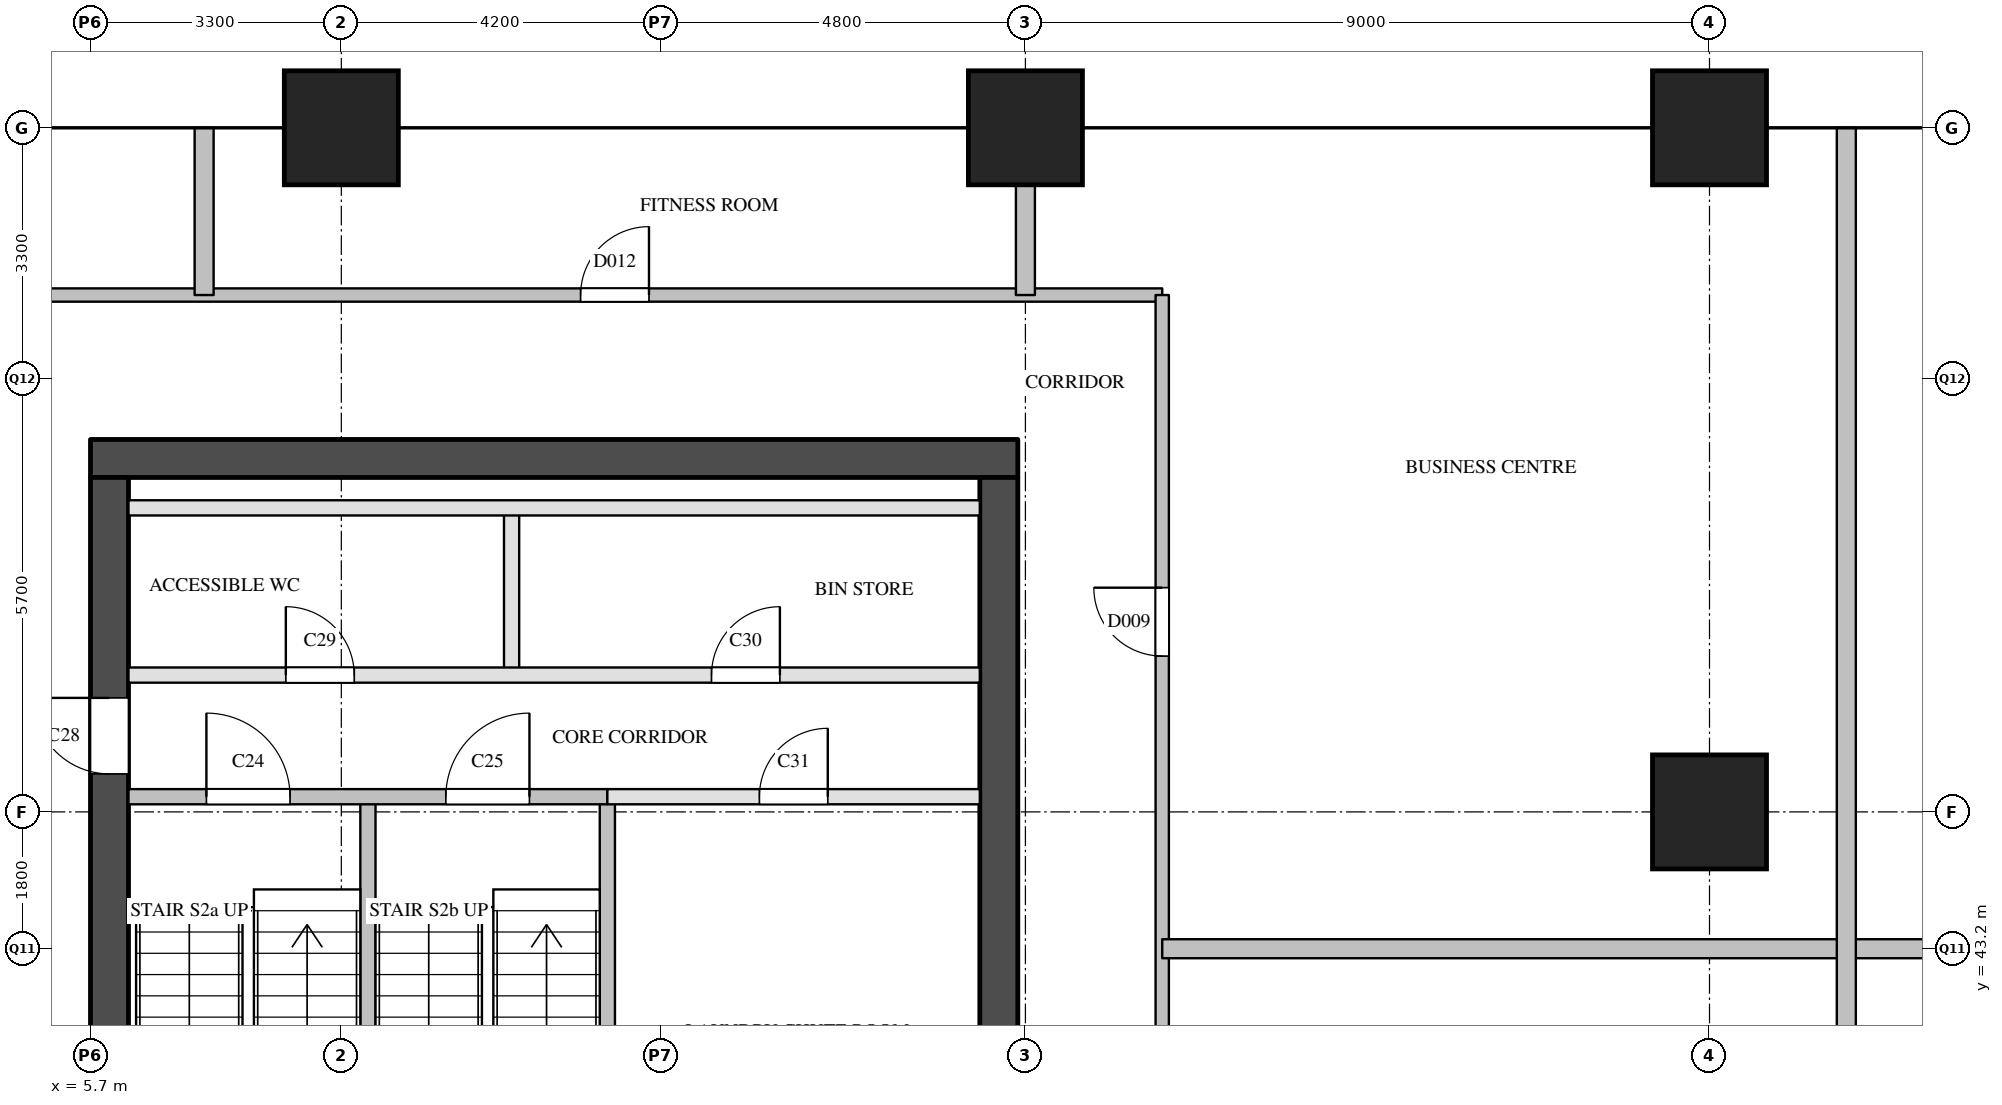
"""IFC4 building model, lengths in metres.
Left out: names, types, materials, properties, quantities, classifications, styles, units other than length and angle.
Written with IfcOpenShell. Run it as: python <this file> out.ifc"""

import sys

from ifc_helpers import new_model, si_unit, direction, frame, frame_2d, origin, origin_2d, place, context, subcontext, project, spatial, rectangle, extrude, element, fill, save


model = new_model("IFC4")
c1 = context("Model", 3, precision=1e-05, world=origin(), true_north=direction((0.0, 1.0)))
c2 = subcontext(c1, "Body", "Model", "MODEL_VIEW")
j1 = project(units=[si_unit("LENGTHUNIT", "METRE"), si_unit("PLANEANGLEUNIT", "RADIAN")], contexts=[c1])
p1 = place(None, origin())
s1 = spatial("IfcSite", under=j1, at=p1, CompositionType="ELEMENT")
p2 = place(p1, origin())
s2 = spatial("IfcBuilding", under=s1, at=p2, CompositionType="ELEMENT")
p3 = place(p2, frame((0.0, 0.0, 185.6)))
s3 = spatial("IfcBuildingStorey", under=s2, at=p3, CompositionType="ELEMENT", Elevation=185.6)
for number, where, z_axis, x_axis in (
    (1, (9.0, 54.0, 0.0), (0.0, 0.0, 1.0), (1.0, 0.0, 0.0)),
    (2, (18.0, 54.0, 0.0), (0.0, 0.0, 1.0), (1.0, 0.0, 0.0)),
    (3, (27.0, 45.0, 0.0), (0.0, 0.0, 1.0), (1.0, 0.0, 0.0)),
    (4, (27.0, 54.0, 0.0), (0.0, 0.0, 1.0), (1.0, 0.0, 0.0)),
):
    element("IfcColumn", number, at=place(p3, frame(where, z_axis=z_axis, x_axis=x_axis)), inside=s3, PredefinedType="COLUMN", context=c2, shape_type="SweptSolid", body=[
        extrude(rectangle(XDim=1.5, YDim=1.5, at=origin_2d()), origin(), (0.0, 0.0, 1.0), 3.9),
    ])
p4 = place(p3, frame((5.7, 49.65, 0.0), z_axis=(0.0, 0.0, 1.0), x_axis=(1.0, 0.0, 0.0)))
e5 = element("IfcWall", 5, at=p4, inside=s3, PredefinedType="SHEAR", context=c2, shape_type="SweptSolid", body=[
    extrude(rectangle(XDim=12.2, YDim=0.5, at=frame_2d((6.1, 0.0))), origin(), (0.0, 0.0, 1.0), 3.6),
])
p5 = place(p3, frame((5.95, 29.1, 0.0), z_axis=(0.0, 0.0, 1.0), x_axis=(0.0, 1.0, 0.0)))
e6 = element("IfcWall", 6, at=p5, inside=s3, PredefinedType="SHEAR", context=c2, shape_type="SweptSolid", body=[
    extrude(rectangle(XDim=20.3, YDim=0.5, at=frame_2d((10.15, 0.0))), origin(), (0.0, 0.0, 1.0), 3.6),
])
p6 = place(p5, frame((3.45, 0.0, 0.0)))
e7 = element("IfcOpeningElement", 7, at=p6, cuts=e6, PredefinedType="OPENING", context=c2, shape_type="SweptSolid", body=[
    extrude(rectangle(XDim=1.0, YDim=2.1, at=frame_2d((0.5, 1.05))), frame((0.0, 0.26, 0.0), z_axis=(0.0, -1.0, 0.0), x_axis=(1.0, 0.0, 0.0)), (0.0, 0.0, 1.0), 0.52),
])
p7 = place(p5, frame((16.4, 0.0, 0.0)))
e8 = element("IfcOpeningElement", 8, at=p7, cuts=e6, PredefinedType="OPENING", context=c2, shape_type="SweptSolid", body=[
    extrude(rectangle(XDim=1.0, YDim=2.1, at=frame_2d((0.5, 1.05))), frame((0.0, 0.26, 0.0), z_axis=(0.0, -1.0, 0.0), x_axis=(1.0, 0.0, 0.0)), (0.0, 0.0, 1.0), 0.52),
])
p8 = place(p3, frame((17.65, 29.1, 0.0), z_axis=(0.0, 0.0, 1.0), x_axis=(0.0, 1.0, 0.0)))
e9 = element("IfcWall", 9, at=p8, inside=s3, PredefinedType="SHEAR", context=c2, shape_type="SweptSolid", body=[
    extrude(rectangle(XDim=20.3, YDim=0.5, at=frame_2d((10.15, 0.0))), origin(), (0.0, 0.0, 1.0), 3.6),
])
p9 = place(p8, frame((1.25, 0.0, 0.0)))
e10 = element("IfcOpeningElement", 10, at=p9, cuts=e9, PredefinedType="OPENING", context=c2, shape_type="SweptSolid", body=[
    extrude(rectangle(XDim=0.7, YDim=2.1, at=frame_2d((0.35, 1.05))), frame((0.0, 0.26, 0.0), z_axis=(0.0, -1.0, 0.0), x_axis=(1.0, 0.0, 0.0)), (0.0, 0.0, 1.0), 0.52),
])
p10 = place(p8, frame((7.05, 0.0, 0.0)))
e11 = element("IfcOpeningElement", 11, at=p10, cuts=e9, PredefinedType="OPENING", context=c2, shape_type="SweptSolid", body=[
    extrude(rectangle(XDim=0.7, YDim=2.1, at=frame_2d((0.35, 1.05))), frame((0.0, 0.26, 0.0), z_axis=(0.0, -1.0, 0.0), x_axis=(1.0, 0.0, 0.0)), (0.0, 0.0, 1.0), 0.52),
])
p11 = place(p8, frame((3.6, 0.0, 0.0)))
e12 = element("IfcOpeningElement", 12, at=p11, cuts=e9, PredefinedType="OPENING", context=c2, shape_type="SweptSolid", body=[
    extrude(rectangle(XDim=1.8, YDim=2.1, at=frame_2d((0.9, 1.05))), frame((0.0, 0.26, 0.0), z_axis=(0.0, -1.0, 0.0), x_axis=(1.0, 0.0, 0.0)), (0.0, 0.0, 1.0), 0.52),
])
p12 = place(p3, frame((9.35, 40.9, 0.0), z_axis=(0.0, 0.0, 1.0), x_axis=(0.0, 1.0, 0.0)))
e13 = element("IfcWall", 13, at=p12, inside=s3, PredefinedType="SOLIDWALL", context=c2, shape_type="SweptSolid", body=[
    extrude(rectangle(XDim=4.3, YDim=0.2, at=frame_2d((2.15, 0.0))), origin(), (0.0, 0.0, 1.0), 3.6),
])
p13 = place(p3, frame((11.24, 46.8, 0.0), z_axis=(0.0, 0.0, 1.0), x_axis=(0.0, 1.0, 0.0)))
e14 = element("IfcWall", 14, at=p13, inside=s3, PredefinedType="PARTITIONING", context=c2, shape_type="SweptSolid", body=[
    extrude(rectangle(XDim=2.2, YDim=0.2, at=frame_2d((1.1, 0.0))), origin(), (0.0, 0.0, 1.0), 3.6),
])
p14 = place(p3, frame((12.5, 40.9, 0.0), z_axis=(0.0, 0.0, 1.0), x_axis=(0.0, 1.0, 0.0)))
e15 = element("IfcWall", 15, at=p14, inside=s3, PredefinedType="SOLIDWALL", context=c2, shape_type="SweptSolid", body=[
    extrude(rectangle(XDim=4.3, YDim=0.2, at=frame_2d((2.15, 0.0))), origin(), (0.0, 0.0, 1.0), 3.6),
])
p15 = place(p3, frame((12.5, 45.2, 0.0), z_axis=(0.0, 0.0, 1.0), x_axis=(1.0, 0.0, 0.0)))
e16 = element("IfcWall", 16, at=p15, inside=s3, PredefinedType="PARTITIONING", context=c2, shape_type="SweptSolid", body=[
    extrude(rectangle(XDim=4.9, YDim=0.2, at=frame_2d((2.45, 0.0))), origin(), (0.0, 0.0, 1.0), 3.6),
])
p16 = place(p15, frame((2.0, 0.0, 0.0)))
e17 = element("IfcOpeningElement", 17, at=p16, cuts=e16, PredefinedType="OPENING", context=c2, shape_type="SweptSolid", body=[
    extrude(rectangle(XDim=0.9, YDim=2.1, at=frame_2d((0.45, 1.05))), frame((0.0, 0.11, 0.0), z_axis=(0.0, -1.0, 0.0), x_axis=(1.0, 0.0, 0.0)), (0.0, 0.0, 1.0), 0.22),
])
p17 = place(p3, frame((6.2, 45.2, 0.0), z_axis=(0.0, 0.0, 1.0), x_axis=(1.0, 0.0, 0.0)))
e18 = element("IfcWall", 18, at=p17, inside=s3, PredefinedType="SOLIDWALL", context=c2, shape_type="SweptSolid", body=[
    extrude(rectangle(XDim=6.3, YDim=0.2, at=frame_2d((3.15, 0.0))), origin(), (0.0, 0.0, 1.0), 3.6),
])
p18 = place(p17, frame((1.025, 0.0, 0.0)))
e19 = element("IfcOpeningElement", 19, at=p18, cuts=e18, PredefinedType="OPENING", context=c2, shape_type="SweptSolid", body=[
    extrude(rectangle(XDim=1.1, YDim=2.1, at=frame_2d((0.55, 1.05))), frame((0.0, 0.11, 0.0), z_axis=(0.0, -1.0, 0.0), x_axis=(1.0, 0.0, 0.0)), (0.0, 0.0, 1.0), 0.22),
])
p19 = place(p17, frame((4.175, 0.0, 0.0)))
e20 = element("IfcOpeningElement", 20, at=p19, cuts=e18, PredefinedType="OPENING", context=c2, shape_type="SweptSolid", body=[
    extrude(rectangle(XDim=1.1, YDim=2.1, at=frame_2d((0.55, 1.05))), frame((0.0, 0.11, 0.0), z_axis=(0.0, -1.0, 0.0), x_axis=(1.0, 0.0, 0.0)), (0.0, 0.0, 1.0), 0.22),
])
p20 = place(p3, frame((6.2, 46.8, 0.0), z_axis=(0.0, 0.0, 1.0), x_axis=(1.0, 0.0, 0.0)))
e21 = element("IfcWall", 21, at=p20, inside=s3, PredefinedType="PARTITIONING", context=c2, shape_type="SweptSolid", body=[
    extrude(rectangle(XDim=11.2, YDim=0.2, at=frame_2d((5.6, 0.0))), origin(), (0.0, 0.0, 1.0), 3.6),
])
p21 = place(p20, frame((2.07, 0.0, 0.0)))
e22 = element("IfcOpeningElement", 22, at=p21, cuts=e21, PredefinedType="OPENING", context=c2, shape_type="SweptSolid", body=[
    extrude(rectangle(XDim=0.9, YDim=2.1, at=frame_2d((0.45, 1.05))), frame((0.0, 0.11, 0.0), z_axis=(0.0, -1.0, 0.0), x_axis=(1.0, 0.0, 0.0)), (0.0, 0.0, 1.0), 0.22),
])
p22 = place(p20, frame((7.67, 0.0, 0.0)))
e23 = element("IfcOpeningElement", 23, at=p22, cuts=e21, PredefinedType="OPENING", context=c2, shape_type="SweptSolid", body=[
    extrude(rectangle(XDim=0.9, YDim=2.1, at=frame_2d((0.45, 1.05))), frame((0.0, 0.11, 0.0), z_axis=(0.0, -1.0, 0.0), x_axis=(1.0, 0.0, 0.0)), (0.0, 0.0, 1.0), 0.22),
])
p23 = place(p3, frame((6.2, 49.0, 0.0), z_axis=(0.0, 0.0, 1.0), x_axis=(1.0, 0.0, 0.0)))
e24 = element("IfcWall", 24, at=p23, inside=s3, PredefinedType="PARTITIONING", context=c2, shape_type="SweptSolid", body=[
    extrude(rectangle(XDim=11.2, YDim=0.2, at=frame_2d((5.6, 0.0))), origin(), (0.0, 0.0, 1.0), 3.6),
])
p24 = place(p3, frame((3.8, 51.8, 0.0), z_axis=(0.0, 0.0, 1.0), x_axis=(1.0, 0.0, 0.0)))
e25 = element("IfcWall", 25, at=p24, inside=s3, PredefinedType="PARTITIONING", context=c2, shape_type="SweptSolid", body=[
    extrude(rectangle(XDim=16.0, YDim=0.175, at=frame_2d((8.0, 0.0))), origin(), (0.0, 0.0, 1.0), 3.6),
])
p25 = place(p24, frame((8.348, 0.0, 0.0)))
e26 = element("IfcOpeningElement", 26, at=p25, cuts=e25, PredefinedType="OPENING", context=c2, shape_type="SweptSolid", body=[
    extrude(rectangle(XDim=0.9, YDim=2.1, at=frame_2d((0.45, 1.05))), frame((0.0, 0.097, 0.0), z_axis=(0.0, -1.0, 0.0), x_axis=(1.0, 0.0, 0.0)), (0.0, 0.0, 1.0), 0.195),
])
p26 = place(p3, frame((19.8, 28.5, 0.0), z_axis=(0.0, 0.0, 1.0), x_axis=(0.0, 1.0, 0.0)))
e27 = element("IfcWall", 27, at=p26, inside=s3, PredefinedType="PARTITIONING", context=c2, shape_type="SweptSolid", body=[
    extrude(rectangle(XDim=23.3, YDim=0.175, at=frame_2d((11.65, 0.0))), origin(), (0.0, 0.0, 1.0), 3.6),
])
p27 = place(p26, frame((3.3, 0.0, 0.0)))
e28 = element("IfcOpeningElement", 28, at=p27, cuts=e27, PredefinedType="OPENING", context=c2, shape_type="SweptSolid", body=[
    extrude(rectangle(XDim=0.9, YDim=2.1, at=frame_2d((0.45, 1.05))), frame((0.0, 0.097, 0.0), z_axis=(0.0, -1.0, 0.0), x_axis=(1.0, 0.0, 0.0)), (0.0, 0.0, 1.0), 0.195),
])
p28 = place(p26, frame((10.65, 0.0, 0.0)))
e29 = element("IfcOpeningElement", 29, at=p28, cuts=e27, PredefinedType="OPENING", context=c2, shape_type="SweptSolid", body=[
    extrude(rectangle(XDim=0.9, YDim=2.1, at=frame_2d((0.45, 1.05))), frame((0.0, 0.097, 0.0), z_axis=(0.0, -1.0, 0.0), x_axis=(1.0, 0.0, 0.0)), (0.0, 0.0, 1.0), 0.195),
])
p29 = place(p26, frame((18.55, 0.0, 0.0)))
e30 = element("IfcOpeningElement", 30, at=p29, cuts=e27, PredefinedType="OPENING", context=c2, shape_type="SweptSolid", body=[
    extrude(rectangle(XDim=0.9, YDim=2.1, at=frame_2d((0.45, 1.05))), frame((0.0, 0.097, 0.0), z_axis=(0.0, -1.0, 0.0), x_axis=(1.0, 0.0, 0.0)), (0.0, 0.0, 1.0), 0.195),
])
p30 = place(p3, frame((19.8, 43.2, 0.0), z_axis=(0.0, 0.0, 1.0), x_axis=(1.0, 0.0, 0.0)))
e31 = element("IfcWall", 31, at=p30, inside=s3, PredefinedType="PARTITIONING", context=c2, shape_type="SweptSolid", body=[
    extrude(rectangle(XDim=14.4, YDim=0.25, at=frame_2d((7.2, 0.0))), origin(), (0.0, 0.0, 1.0), 2.6),
])
p31 = place(p3, frame((7.195, 51.8, 0.0), z_axis=(0.0, 0.0, 1.0), x_axis=(0.0, 1.0, 0.0)))
e32 = element("IfcWall", 32, at=p31, inside=s3, PredefinedType="PARTITIONING", context=c2, shape_type="SweptSolid", body=[
    extrude(rectangle(XDim=2.2, YDim=0.25, at=frame_2d((1.1, 0.0))), origin(), (0.0, 0.0, 1.0), 2.6),
])
p32 = place(p3, frame((18.0, 51.8, 0.0), z_axis=(0.0, 0.0, 1.0), x_axis=(0.0, 1.0, 0.0)))
e33 = element("IfcWall", 33, at=p32, inside=s3, PredefinedType="PARTITIONING", context=c2, shape_type="SweptSolid", body=[
    extrude(rectangle(XDim=2.2, YDim=0.25, at=frame_2d((1.1, 0.0))), origin(), (0.0, 0.0, 1.0), 3.6),
])
p33 = place(p3, frame((28.8, 36.0, 0.0), z_axis=(0.0, 0.0, 1.0), x_axis=(0.0, 1.0, 0.0)))
e34 = element("IfcWall", 34, at=p33, inside=s3, PredefinedType="PARTITIONING", context=c2, shape_type="SweptSolid", body=[
    extrude(rectangle(XDim=18.0, YDim=0.25, at=frame_2d((9.0, 0.0))), origin(), (0.0, 0.0, 1.0), 2.6),
])
p34 = place(p18, origin())
e35 = element("IfcDoor", 35, at=p34, inside=s3, OperationType="SINGLE_SWING_LEFT", PredefinedType="DOOR", context=c2, shape_type="SweptSolid", body=[
    extrude(rectangle(XDim=1.1, YDim=2.1, at=frame_2d((0.55, 1.05))), frame((0.0, 0.025, 0.0), z_axis=(0.0, -1.0, 0.0), x_axis=(1.0, 0.0, 0.0)), (0.0, 0.0, 1.0), 0.05),
])
fill(e19, e35)
p35 = place(p19, origin())
e36 = element("IfcDoor", 36, at=p35, inside=s3, OperationType="SINGLE_SWING_RIGHT", PredefinedType="DOOR", context=c2, shape_type="SweptSolid", body=[
    extrude(rectangle(XDim=1.1, YDim=2.1, at=frame_2d((0.55, 1.05))), frame((0.0, 0.025, 0.0), z_axis=(0.0, -1.0, 0.0), x_axis=(1.0, 0.0, 0.0)), (0.0, 0.0, 1.0), 0.05),
])
fill(e20, e36)
p36 = place(p7, origin())
e37 = element("IfcDoor", 37, at=p36, inside=s3, OperationType="SINGLE_SWING_RIGHT", PredefinedType="DOOR", context=c2, shape_type="SweptSolid", body=[
    extrude(rectangle(XDim=1.0, YDim=2.1, at=frame_2d((0.5, 1.05))), frame((0.0, 0.025, 0.0), z_axis=(0.0, -1.0, 0.0), x_axis=(1.0, 0.0, 0.0)), (0.0, 0.0, 1.0), 0.05),
])
fill(e8, e37)
p37 = place(p21, origin())
e38 = element("IfcDoor", 38, at=p37, inside=s3, OperationType="SINGLE_SWING_LEFT", PredefinedType="DOOR", context=c2, shape_type="SweptSolid", body=[
    extrude(rectangle(XDim=0.9, YDim=2.1, at=frame_2d((0.45, 1.05))), frame((0.0, 0.025, 0.0), z_axis=(0.0, -1.0, 0.0), x_axis=(1.0, 0.0, 0.0)), (0.0, 0.0, 1.0), 0.05),
])
fill(e22, e38)
p38 = place(p22, origin())
e39 = element("IfcDoor", 39, at=p38, inside=s3, OperationType="SINGLE_SWING_RIGHT", PredefinedType="DOOR", context=c2, shape_type="SweptSolid", body=[
    extrude(rectangle(XDim=0.9, YDim=2.1, at=frame_2d((0.45, 1.05))), frame((0.0, 0.025, 0.0), z_axis=(0.0, -1.0, 0.0), x_axis=(1.0, 0.0, 0.0)), (0.0, 0.0, 1.0), 0.05),
])
fill(e23, e39)
p39 = place(p16, origin())
e40 = element("IfcDoor", 40, at=p39, inside=s3, OperationType="SINGLE_SWING_RIGHT", PredefinedType="DOOR", context=c2, shape_type="SweptSolid", body=[
    extrude(rectangle(XDim=0.9, YDim=2.1, at=frame_2d((0.45, 1.05))), frame((0.0, 0.025, 0.0), z_axis=(0.0, -1.0, 0.0), x_axis=(1.0, 0.0, 0.0)), (0.0, 0.0, 1.0), 0.05),
])
fill(e17, e40)
p40 = place(p29, origin())
e41 = element("IfcDoor", 41, at=p40, inside=s3, OperationType="SINGLE_SWING_RIGHT", PredefinedType="DOOR", context=c2, shape_type="SweptSolid", body=[
    extrude(rectangle(XDim=0.9, YDim=2.1, at=frame_2d((0.45, 1.05))), frame((0.0, 0.025, 0.0), z_axis=(0.0, -1.0, 0.0), x_axis=(1.0, 0.0, 0.0)), (0.0, 0.0, 1.0), 0.05),
])
fill(e30, e41)
p41 = place(p25, origin())
e42 = element("IfcDoor", 42, at=p41, inside=s3, OperationType="SINGLE_SWING_RIGHT", PredefinedType="DOOR", context=c2, shape_type="SweptSolid", body=[
    extrude(rectangle(XDim=0.9, YDim=2.1, at=frame_2d((0.45, 1.05))), frame((0.0, 0.025, 0.0), z_axis=(0.0, -1.0, 0.0), x_axis=(1.0, 0.0, 0.0)), (0.0, 0.0, 1.0), 0.05),
])
fill(e26, e42)
save(model, sys.argv[1])
